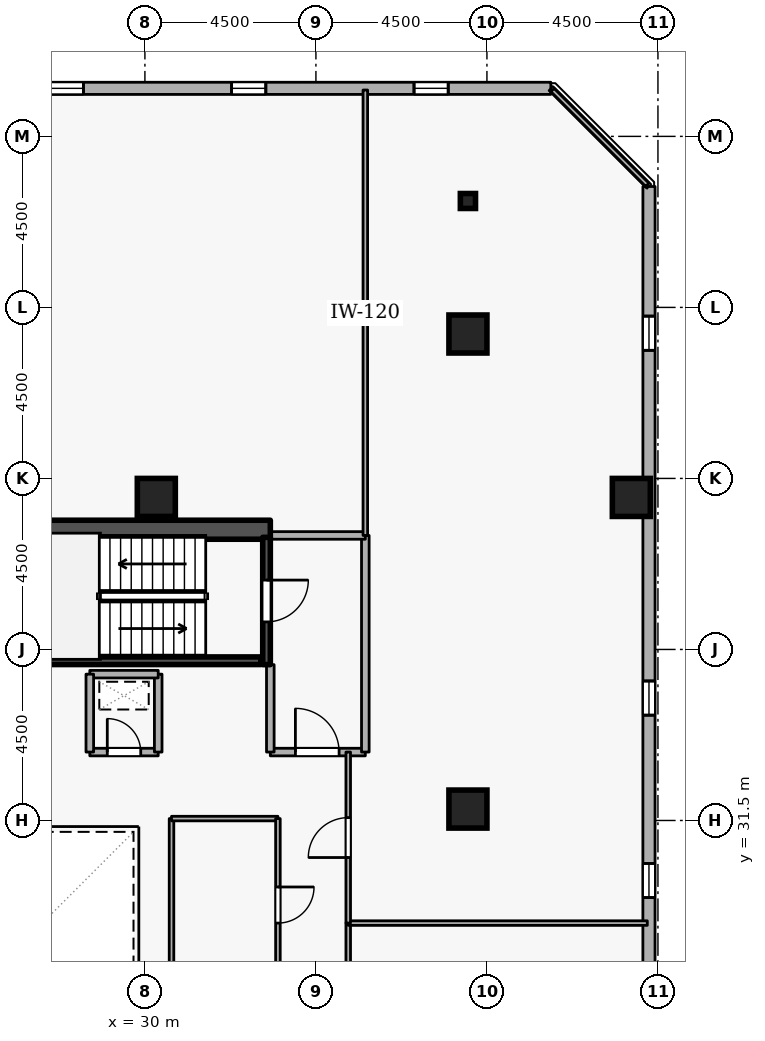
"""IFC4 building model, lengths in metres.
Left out: names, types, materials, properties, quantities, classifications, styles, units other than length and angle.
Written with IfcOpenShell. Run it as: python <this file> out.ifc"""

import sys

from ifc_helpers import new_model, si_unit, direction, frame, frame_2d, origin, origin_2d, place, context, subcontext, project, spatial, rectangle, i_section, extrude, element, fill, save


model = new_model("IFC4")
c1 = context("Model", 3, precision=1e-05, world=origin(), true_north=direction((0.0, 1.0)))
c2 = subcontext(c1, "Body", "Model", "MODEL_VIEW")
j1 = project(units=[si_unit("LENGTHUNIT", "METRE"), si_unit("PLANEANGLEUNIT", "RADIAN")], contexts=[c1])
p1 = place(None, origin())
s1 = spatial("IfcSite", under=j1, at=p1, CompositionType="ELEMENT")
p2 = place(p1, origin())
s2 = spatial("IfcBuilding", under=s1, at=p2, CompositionType="ELEMENT")
p3 = place(p2, frame((0.0, 0.0, 214.5)))
s3 = spatial("IfcBuildingStorey", under=s2, at=p3, CompositionType="ELEMENT", Elevation=214.5)
p4 = place(p3, frame((17.7, 39.15, 0.0), z_axis=(0.0, 0.0, 1.0), x_axis=(1.0, 0.0, 0.0)))
e1 = element("IfcWall", 1, at=p4, inside=s3, PredefinedType="SHEAR", context=c2, shape_type="SweptSolid", body=[
    extrude(rectangle(XDim=15.6, YDim=0.5, at=frame_2d((7.8, 0.0))), origin(), (0.0, 0.0, 1.0), 3.6),
])
for number, where, z_axis, x_axis in (
    (2, (42.8, 40.0, 0.0), (0.0, 0.0, 1.0), (1.0, 0.0, 0.0)),
    (3, (38.5, 44.3, 0.0), (0.0, 0.0, 1.0), (1.0, 0.0, 0.0)),
    (4, (38.5, 31.8, 0.0), (0.0, 0.0, 1.0), (1.0, 0.0, 0.0)),
    (5, (30.3, 40.0, 0.0), (0.0, 0.0, 1.0), (1.0, 0.0, 0.0)),
):
    element("IfcColumn", number, at=place(p3, frame(where, z_axis=z_axis, x_axis=x_axis)), inside=s3, PredefinedType="COLUMN", context=c2, shape_type="SweptSolid", body=[
        extrude(rectangle(XDim=1.0, YDim=1.0, at=origin_2d()), origin(), (0.0, 0.0, 1.0), 3.6),
    ])
p5 = place(p3, frame((38.5, 47.8, 0.0), z_axis=(0.0, 0.0, 1.0), x_axis=(1.0, 0.0, 0.0)))
e6 = element("IfcColumn", 6, at=p5, inside=s3, PredefinedType="COLUMN", context=c2, shape_type="SweptSolid", body=[
    extrude(i_section(OverallWidth=0.399, OverallDepth=0.394, WebThickness=0.023, FlangeThickness=0.037, FilletRadius=0.015, at=origin_2d()), origin(), (0.0, 0.0, 1.0), 3.6),
])
p6 = place(p3, frame((43.263, 12.371, 0.0), z_axis=(0.0, 0.0, 1.0), x_axis=(5.4540124e-05, 0.999999998513, 0.0)))
e7 = element("IfcWall", 7, at=p6, inside=s3, PredefinedType="STANDARD", context=c2, shape_type="SweptSolid", body=[
    extrude(rectangle(XDim=35.811, YDim=0.32, at=frame_2d((17.905, 0.0))), origin(), (0.0, 0.0, 1.0), 2.7),
])
p7 = place(p6, frame((2.7, 0.0, 0.72)))
e8 = element("IfcOpeningElement", 8, at=p7, cuts=e7, PredefinedType="OPENING", context=c2, shape_type="SweptSolid", body=[
    extrude(rectangle(XDim=0.9, YDim=1.75, at=frame_2d((0.45, 0.875))), frame((0.0, 0.17, 0.0), z_axis=(0.0, -1.0, 0.0), x_axis=(1.0, 0.0, 0.0)), (0.0, 0.0, 1.0), 0.34),
])
p8 = place(p6, frame((7.5, 0.0, 0.72)))
e9 = element("IfcOpeningElement", 9, at=p8, cuts=e7, PredefinedType="OPENING", context=c2, shape_type="SweptSolid", body=[
    extrude(rectangle(XDim=0.9, YDim=1.75, at=frame_2d((0.45, 0.875))), frame((0.0, 0.17, 0.0), z_axis=(0.0, -1.0, 0.0), x_axis=(1.0, 0.0, 0.0)), (0.0, 0.0, 1.0), 0.34),
])
p9 = place(p6, frame((12.3, 0.0, 0.72)))
e10 = element("IfcOpeningElement", 10, at=p9, cuts=e7, PredefinedType="OPENING", context=c2, shape_type="SweptSolid", body=[
    extrude(rectangle(XDim=0.9, YDim=1.75, at=frame_2d((0.45, 0.875))), frame((0.0, 0.17, 0.0), z_axis=(0.0, -1.0, 0.0), x_axis=(1.0, 0.0, 0.0)), (0.0, 0.0, 1.0), 0.34),
])
p10 = place(p6, frame((17.1, 0.0, 0.72)))
e11 = element("IfcOpeningElement", 11, at=p10, cuts=e7, PredefinedType="OPENING", context=c2, shape_type="SweptSolid", body=[
    extrude(rectangle(XDim=0.9, YDim=1.75, at=frame_2d((0.45, 0.875))), frame((0.0, 0.17, 0.0), z_axis=(0.0, -1.0, 0.0), x_axis=(1.0, 0.0, 0.0)), (0.0, 0.0, 1.0), 0.34),
])
p11 = place(p6, frame((21.9, 0.0, 0.72)))
e12 = element("IfcOpeningElement", 12, at=p11, cuts=e7, PredefinedType="OPENING", context=c2, shape_type="SweptSolid", body=[
    extrude(rectangle(XDim=0.9, YDim=1.75, at=frame_2d((0.45, 0.875))), frame((0.0, 0.17, 0.0), z_axis=(0.0, -1.0, 0.0), x_axis=(1.0, 0.0, 0.0)), (0.0, 0.0, 1.0), 0.34),
])
p12 = place(p6, frame((31.5, 0.0, 0.72)))
e13 = element("IfcOpeningElement", 13, at=p12, cuts=e7, PredefinedType="OPENING", context=c2, shape_type="SweptSolid", body=[
    extrude(rectangle(XDim=0.9, YDim=1.75, at=frame_2d((0.45, 0.875))), frame((0.0, 0.17, 0.0), z_axis=(0.0, -1.0, 0.0), x_axis=(1.0, 0.0, 0.0)), (0.0, 0.0, 1.0), 0.34),
])
p13 = place(p3, frame((40.681, 50.765, 0.0), z_axis=(0.0, 0.0, 1.0), x_axis=(-0.999999998513, -5.4540124e-05, 0.0)))
e14 = element("IfcWall", 14, at=p13, inside=s3, PredefinedType="STANDARD", context=c2, shape_type="SweptSolid", body=[
    extrude(rectangle(XDim=35.811, YDim=0.32, at=frame_2d((17.905, 0.0))), origin(), (0.0, 0.0, 1.0), 2.7),
])
p14 = place(p13, frame((2.7, 0.0, 0.72)))
e15 = element("IfcOpeningElement", 15, at=p14, cuts=e14, PredefinedType="OPENING", context=c2, shape_type="SweptSolid", body=[
    extrude(rectangle(XDim=0.9, YDim=1.75, at=frame_2d((0.45, 0.875))), frame((0.0, 0.17, 0.0), z_axis=(0.0, -1.0, 0.0), x_axis=(1.0, 0.0, 0.0)), (0.0, 0.0, 1.0), 0.34),
])
p15 = place(p13, frame((7.5, 0.0, 0.72)))
e16 = element("IfcOpeningElement", 16, at=p15, cuts=e14, PredefinedType="OPENING", context=c2, shape_type="SweptSolid", body=[
    extrude(rectangle(XDim=0.9, YDim=1.75, at=frame_2d((0.45, 0.875))), frame((0.0, 0.17, 0.0), z_axis=(0.0, -1.0, 0.0), x_axis=(1.0, 0.0, 0.0)), (0.0, 0.0, 1.0), 0.34),
])
p16 = place(p13, frame((12.3, 0.0, 0.72)))
e17 = element("IfcOpeningElement", 17, at=p16, cuts=e14, PredefinedType="OPENING", context=c2, shape_type="SweptSolid", body=[
    extrude(rectangle(XDim=0.9, YDim=1.75, at=frame_2d((0.45, 0.875))), frame((0.0, 0.17, 0.0), z_axis=(0.0, -1.0, 0.0), x_axis=(1.0, 0.0, 0.0)), (0.0, 0.0, 1.0), 0.34),
])
p17 = place(p13, frame((17.1, 0.0, 0.72)))
e18 = element("IfcOpeningElement", 18, at=p17, cuts=e14, PredefinedType="OPENING", context=c2, shape_type="SweptSolid", body=[
    extrude(rectangle(XDim=0.9, YDim=1.75, at=frame_2d((0.45, 0.875))), frame((0.0, 0.17, 0.0), z_axis=(0.0, -1.0, 0.0), x_axis=(1.0, 0.0, 0.0)), (0.0, 0.0, 1.0), 0.34),
])
p18 = place(p13, frame((31.5, 0.0, 0.72)))
e19 = element("IfcOpeningElement", 19, at=p18, cuts=e14, PredefinedType="OPENING", context=c2, shape_type="SweptSolid", body=[
    extrude(rectangle(XDim=0.9, YDim=1.75, at=frame_2d((0.45, 0.875))), frame((0.0, 0.17, 0.0), z_axis=(0.0, -1.0, 0.0), x_axis=(1.0, 0.0, 0.0)), (0.0, 0.0, 1.0), 0.34),
])
p19 = place(p3, frame((33.2, 38.95, 0.0), z_axis=(0.0, 0.0, 1.0), x_axis=(0.0, -1.0, 0.0)))
e20 = element("IfcWall", 20, at=p19, inside=s3, PredefinedType="SHEAR", context=c2, shape_type="SweptSolid", body=[
    extrude(rectangle(XDim=3.35, YDim=0.2, at=frame_2d((1.675, 0.0))), origin(), (0.0, 0.0, 1.0), 3.6),
])
p20 = place(p19, frame((1.125, 0.0, 0.0)))
e21 = element("IfcOpeningElement", 21, at=p20, cuts=e20, PredefinedType="OPENING", context=c2, shape_type="SweptSolid", body=[
    extrude(rectangle(XDim=1.1, YDim=2.1, at=frame_2d((0.55, 1.05))), frame((0.0, 0.11, 0.0), z_axis=(0.0, -1.0, 0.0), x_axis=(1.0, 0.0, 0.0)), (0.0, 0.0, 1.0), 0.22),
])
p21 = place(p3, frame((25.95, 35.703, 0.0), z_axis=(0.0, 0.0, 1.0), x_axis=(1.0, 0.0, 0.0)))
e22 = element("IfcWall", 22, at=p21, inside=s3, PredefinedType="SHEAR", context=c2, shape_type="SweptSolid", body=[
    extrude(rectangle(XDim=7.1, YDim=0.2, at=frame_2d((3.55, 0.0))), origin(), (0.0, 0.0, 1.0), 3.6),
])
p22 = place(p3, frame((33.3, 33.3, 0.0), z_axis=(0.0, 0.0, 1.0), x_axis=(1.0, 0.0, 0.0)))
e23 = element("IfcWall", 23, at=p22, inside=s3, PredefinedType="STANDARD", context=c2, shape_type="SweptSolid", body=[
    extrude(rectangle(XDim=2.5, YDim=0.2, at=frame_2d((1.25, 0.0))), origin(), (0.0, 0.0, 1.0), 3.34),
])
p23 = place(p22, frame((0.66, 0.0, 0.0)))
e24 = element("IfcOpeningElement", 24, at=p23, cuts=e23, PredefinedType="OPENING", context=c2, shape_type="SweptSolid", body=[
    extrude(rectangle(XDim=1.15, YDim=2.1, at=frame_2d((0.575, 1.05))), frame((0.0, 0.11, 0.0), z_axis=(0.0, -1.0, 0.0), x_axis=(1.0, 0.0, 0.0)), (0.0, 0.0, 1.0), 0.22),
])
p24 = place(p3, frame((35.8, 33.3, 0.0), z_axis=(0.0, 0.0, 1.0), x_axis=(0.0, 1.0, 0.0)))
e25 = element("IfcWall", 25, at=p24, inside=s3, PredefinedType="STANDARD", context=c2, shape_type="SweptSolid", body=[
    extrude(rectangle(XDim=5.7, YDim=0.2, at=frame_2d((2.85, 0.0))), origin(), (0.0, 0.0, 1.0), 3.34),
])
p25 = place(p3, frame((35.8, 39.0, 0.0), z_axis=(0.0, 0.0, 1.0), x_axis=(-1.0, 0.0, 0.0)))
e26 = element("IfcWall", 26, at=p25, inside=s3, PredefinedType="STANDARD", context=c2, shape_type="SweptSolid", body=[
    extrude(rectangle(XDim=2.5, YDim=0.2, at=frame_2d((1.25, 0.0))), origin(), (0.0, 0.0, 1.0), 3.34),
])
p26 = place(p3, frame((33.3, 35.6, 0.0), z_axis=(0.0, 0.0, 1.0), x_axis=(0.0, -1.0, 0.0)))
e27 = element("IfcWall", 27, at=p26, inside=s3, PredefinedType="STANDARD", context=c2, shape_type="SweptSolid", body=[
    extrude(rectangle(XDim=2.3, YDim=0.2, at=frame_2d((1.15, 0.0))), origin(), (0.0, 0.0, 1.0), 2.545),
])
p27 = place(p3, frame((28.55, 33.3, 0.0), z_axis=(0.0, 0.0, 1.0), x_axis=(1.0, 0.0, 0.0)))
e28 = element("IfcWall", 28, at=p27, inside=s3, PredefinedType="STANDARD", context=c2, shape_type="SweptSolid", body=[
    extrude(rectangle(XDim=1.8, YDim=0.2, at=frame_2d((0.9, 0.0))), origin(), (0.0, 0.0, 1.0), 3.34),
])
p28 = place(p27, frame((0.46, 0.0, 0.0)))
e29 = element("IfcOpeningElement", 29, at=p28, cuts=e28, PredefinedType="OPENING", context=c2, shape_type="SweptSolid", body=[
    extrude(rectangle(XDim=0.88, YDim=2.04, at=frame_2d((0.44, 1.02))), frame((0.0, 0.11, 0.0), z_axis=(0.0, -1.0, 0.0), x_axis=(1.0, 0.0, 0.0)), (0.0, 0.0, 1.0), 0.22),
])
p29 = place(p3, frame((30.35, 33.3, 0.0), z_axis=(0.0, 0.0, 1.0), x_axis=(0.0, 1.0, 0.0)))
e30 = element("IfcWall", 30, at=p29, inside=s3, PredefinedType="STANDARD", context=c2, shape_type="SweptSolid", body=[
    extrude(rectangle(XDim=2.05, YDim=0.2, at=frame_2d((1.025, 0.0))), origin(), (0.0, 0.0, 1.0), 3.34),
])
p30 = place(p3, frame((30.35, 35.35, 0.0), z_axis=(0.0, 0.0, 1.0), x_axis=(-1.0, 0.0, 0.0)))
e31 = element("IfcWall", 31, at=p30, inside=s3, PredefinedType="STANDARD", context=c2, shape_type="SweptSolid", body=[
    extrude(rectangle(XDim=1.8, YDim=0.2, at=frame_2d((0.9, 0.0))), origin(), (0.0, 0.0, 1.0), 3.34),
])
p31 = place(p3, frame((28.55, 35.35, 0.0), z_axis=(0.0, 0.0, 1.0), x_axis=(0.0, -1.0, 0.0)))
e32 = element("IfcWall", 32, at=p31, inside=s3, PredefinedType="STANDARD", context=c2, shape_type="SweptSolid", body=[
    extrude(rectangle(XDim=2.05, YDim=0.2, at=frame_2d((1.025, 0.0))), origin(), (0.0, 0.0, 1.0), 3.34),
])
p32 = place(p3, frame((35.35, 22.5, 0.0), z_axis=(0.0, 0.0, 1.0), x_axis=(0.0, 1.0, 0.0)))
e33 = element("IfcWall", 33, at=p32, inside=s3, PredefinedType="PARTITIONING", context=c2, shape_type="SweptSolid", body=[
    extrude(rectangle(XDim=6.3, YDim=0.12, at=frame_2d((3.15, 0.0))), origin(), (0.0, 0.0, 1.0), 3.34),
])
p33 = place(p32, frame((2.675, 0.0, 0.0)))
e34 = element("IfcOpeningElement", 34, at=p33, cuts=e33, PredefinedType="OPENING", context=c2, shape_type="SweptSolid", body=[
    extrude(rectangle(XDim=0.95, YDim=2.1, at=frame_2d((0.475, 1.05))), frame((0.0, 0.07, 0.0), z_axis=(0.0, -1.0, 0.0), x_axis=(1.0, 0.0, 0.0)), (0.0, 0.0, 1.0), 0.14),
])
p34 = place(p3, frame((35.35, 28.8, 0.0), z_axis=(0.0, 0.0, 1.0), x_axis=(1.0, 0.0, 0.0)))
e35 = element("IfcWall", 35, at=p34, inside=s3, PredefinedType="PARTITIONING", context=c2, shape_type="SweptSolid", body=[
    extrude(rectangle(XDim=7.87, YDim=0.12, at=frame_2d((3.935, 0.0))), origin(), (0.0, 0.0, 1.0), 3.34),
])
p35 = place(p3, frame((35.8, 39.0, 0.0), z_axis=(0.0, 0.0, 1.0), x_axis=(0.0, 1.0, 0.0)))
e36 = element("IfcWall", 36, at=p35, inside=s3, PredefinedType="PARTITIONING", context=c2, shape_type="SweptSolid", body=[
    extrude(rectangle(XDim=11.72, YDim=0.12, at=frame_2d((5.86, 0.0))), origin(), (0.0, 0.0, 1.0), 3.34),
])
p36 = place(p3, frame((40.725, 50.72, 0.0), z_axis=(0.0, 0.0, 1.0), x_axis=(0.707106781187, -0.707106781187, 0.0)))
e37 = element("IfcWall", 37, at=p36, inside=s3, PredefinedType="PARTITIONING", context=c2, shape_type="SweptSolid", body=[
    extrude(rectangle(XDim=3.528, YDim=0.12, at=frame_2d((1.764, 0.0))), origin(), (0.0, 0.0, 1.0), 3.34),
])
p37 = place(p3, frame((35.35, 28.8, 0.0), z_axis=(0.0, 0.0, 1.0), x_axis=(0.0, 1.0, 0.0)))
e38 = element("IfcWall", 38, at=p37, inside=s3, PredefinedType="PARTITIONING", context=c2, shape_type="SweptSolid", body=[
    extrude(rectangle(XDim=4.5, YDim=0.12, at=frame_2d((2.25, 0.0))), origin(), (0.0, 0.0, 1.0), 3.34),
])
p38 = place(p37, frame((1.725, 0.0, 0.0)))
e39 = element("IfcOpeningElement", 39, at=p38, cuts=e38, PredefinedType="OPENING", context=c2, shape_type="SweptSolid", body=[
    extrude(rectangle(XDim=1.05, YDim=2.1, at=frame_2d((0.525, 1.05))), frame((0.0, 0.07, 0.0), z_axis=(0.0, -1.0, 0.0), x_axis=(1.0, 0.0, 0.0)), (0.0, 0.0, 1.0), 0.14),
])
p39 = place(p3, frame((30.7, 27.0, 0.0), z_axis=(0.0, 0.0, 1.0), x_axis=(0.0, 1.0, 0.0)))
e40 = element("IfcWall", 40, at=p39, inside=s3, PredefinedType="PARTITIONING", context=c2, shape_type="SweptSolid", body=[
    extrude(rectangle(XDim=4.55, YDim=0.12, at=frame_2d((2.275, 0.0))), origin(), (0.0, 0.0, 1.0), 3.34),
])
p40 = place(p3, frame((30.7, 31.55, 0.0), z_axis=(0.0, 0.0, 1.0), x_axis=(1.0, 0.0, 0.0)))
e41 = element("IfcWall", 41, at=p40, inside=s3, PredefinedType="PARTITIONING", context=c2, shape_type="SweptSolid", body=[
    extrude(rectangle(XDim=2.8, YDim=0.12, at=frame_2d((1.4, 0.0))), origin(), (0.0, 0.0, 1.0), 3.34),
])
p41 = place(p3, frame((33.5, 31.55, 0.0), z_axis=(0.0, 0.0, 1.0), x_axis=(0.0, -1.0, 0.0)))
e42 = element("IfcWall", 42, at=p41, inside=s3, PredefinedType="PARTITIONING", context=c2, shape_type="SweptSolid", body=[
    extrude(rectangle(XDim=4.55, YDim=0.12, at=frame_2d((2.275, 0.0))), origin(), (0.0, 0.0, 1.0), 3.34),
])
p42 = place(p41, frame((1.8, 0.0, 0.0)))
e43 = element("IfcOpeningElement", 43, at=p42, cuts=e42, PredefinedType="OPENING", context=c2, shape_type="SweptSolid", body=[
    extrude(rectangle(XDim=0.95, YDim=2.1, at=frame_2d((0.475, 1.05))), frame((0.0, 0.07, 0.0), z_axis=(0.0, -1.0, 0.0), x_axis=(1.0, 0.0, 0.0)), (0.0, 0.0, 1.0), 0.14),
])
p43 = place(p10, origin())
e44 = element("IfcWindow", 44, at=p43, inside=s3, PartitioningType="SINGLE_PANEL", PredefinedType="WINDOW", context=c2, shape_type="SweptSolid", body=[
    extrude(rectangle(XDim=0.9, YDim=1.75, at=frame_2d((0.45, 0.875))), frame((0.0, 0.03, 0.0), z_axis=(0.0, -1.0, 0.0), x_axis=(1.0, 0.0, 0.0)), (0.0, 0.0, 1.0), 0.06),
])
fill(e11, e44)
p44 = place(p11, origin())
e45 = element("IfcWindow", 45, at=p44, inside=s3, PartitioningType="SINGLE_PANEL", PredefinedType="WINDOW", context=c2, shape_type="SweptSolid", body=[
    extrude(rectangle(XDim=0.9, YDim=1.75, at=frame_2d((0.45, 0.875))), frame((0.0, 0.03, 0.0), z_axis=(0.0, -1.0, 0.0), x_axis=(1.0, 0.0, 0.0)), (0.0, 0.0, 1.0), 0.06),
])
fill(e12, e45)
p45 = place(p12, origin())
e46 = element("IfcWindow", 46, at=p45, inside=s3, PartitioningType="SINGLE_PANEL", PredefinedType="WINDOW", context=c2, shape_type="SweptSolid", body=[
    extrude(rectangle(XDim=0.9, YDim=1.75, at=frame_2d((0.45, 0.875))), frame((0.0, 0.03, 0.0), z_axis=(0.0, -1.0, 0.0), x_axis=(1.0, 0.0, 0.0)), (0.0, 0.0, 1.0), 0.06),
])
fill(e13, e46)
p46 = place(p14, origin())
e47 = element("IfcWindow", 47, at=p46, inside=s3, PartitioningType="SINGLE_PANEL", PredefinedType="WINDOW", context=c2, shape_type="SweptSolid", body=[
    extrude(rectangle(XDim=0.9, YDim=1.75, at=frame_2d((0.45, 0.875))), frame((0.0, 0.03, 0.0), z_axis=(0.0, -1.0, 0.0), x_axis=(1.0, 0.0, 0.0)), (0.0, 0.0, 1.0), 0.06),
])
fill(e15, e47)
p47 = place(p15, origin())
e48 = element("IfcWindow", 48, at=p47, inside=s3, PartitioningType="SINGLE_PANEL", PredefinedType="WINDOW", context=c2, shape_type="SweptSolid", body=[
    extrude(rectangle(XDim=0.9, YDim=1.75, at=frame_2d((0.45, 0.875))), frame((0.0, 0.03, 0.0), z_axis=(0.0, -1.0, 0.0), x_axis=(1.0, 0.0, 0.0)), (0.0, 0.0, 1.0), 0.06),
])
fill(e16, e48)
p48 = place(p16, origin())
e49 = element("IfcWindow", 49, at=p48, inside=s3, PartitioningType="SINGLE_PANEL", PredefinedType="WINDOW", context=c2, shape_type="SweptSolid", body=[
    extrude(rectangle(XDim=0.9, YDim=1.75, at=frame_2d((0.45, 0.875))), frame((0.0, 0.03, 0.0), z_axis=(0.0, -1.0, 0.0), x_axis=(1.0, 0.0, 0.0)), (0.0, 0.0, 1.0), 0.06),
])
fill(e17, e49)
p49 = place(p20, origin())
e50 = element("IfcDoor", 50, at=p49, inside=s3, OperationType="SINGLE_SWING_LEFT", PredefinedType="DOOR", context=c2, shape_type="SweptSolid", body=[
    extrude(rectangle(XDim=1.1, YDim=2.1, at=frame_2d((0.55, 1.05))), frame((0.0, 0.025, 0.0), z_axis=(0.0, -1.0, 0.0), x_axis=(1.0, 0.0, 0.0)), (0.0, 0.0, 1.0), 0.05),
])
fill(e21, e50)
p50 = place(p23, origin())
e51 = element("IfcDoor", 51, at=p50, inside=s3, OperationType="SINGLE_SWING_LEFT", PredefinedType="DOOR", context=c2, shape_type="SweptSolid", body=[
    extrude(rectangle(XDim=1.15, YDim=2.1, at=frame_2d((0.575, 1.05))), frame((0.0, 0.025, 0.0), z_axis=(0.0, -1.0, 0.0), x_axis=(1.0, 0.0, 0.0)), (0.0, 0.0, 1.0), 0.05),
])
fill(e24, e51)
p51 = place(p28, origin())
e52 = element("IfcDoor", 52, at=p51, inside=s3, OperationType="SINGLE_SWING_LEFT", PredefinedType="DOOR", context=c2, shape_type="SweptSolid", body=[
    extrude(rectangle(XDim=0.88, YDim=2.04, at=frame_2d((0.44, 1.02))), frame((0.0, 0.025, 0.0), z_axis=(0.0, -1.0, 0.0), x_axis=(1.0, 0.0, 0.0)), (0.0, 0.0, 1.0), 0.05),
])
fill(e29, e52)
p52 = place(p38, origin())
e53 = element("IfcDoor", 53, at=p52, inside=s3, OperationType="SINGLE_SWING_LEFT", PredefinedType="DOOR", context=c2, shape_type="SweptSolid", body=[
    extrude(rectangle(XDim=1.05, YDim=2.1, at=frame_2d((0.525, 1.05))), frame((0.0, 0.025, 0.0), z_axis=(0.0, -1.0, 0.0), x_axis=(1.0, 0.0, 0.0)), (0.0, 0.0, 1.0), 0.05),
])
fill(e39, e53)
p53 = place(p42, origin())
e54 = element("IfcDoor", 54, at=p53, inside=s3, OperationType="SINGLE_SWING_LEFT", PredefinedType="DOOR", context=c2, shape_type="SweptSolid", body=[
    extrude(rectangle(XDim=0.95, YDim=2.1, at=frame_2d((0.475, 1.05))), frame((0.0, 0.025, 0.0), z_axis=(0.0, -1.0, 0.0), x_axis=(1.0, 0.0, 0.0)), (0.0, 0.0, 1.0), 0.05),
])
fill(e43, e54)
save(model, sys.argv[1])
